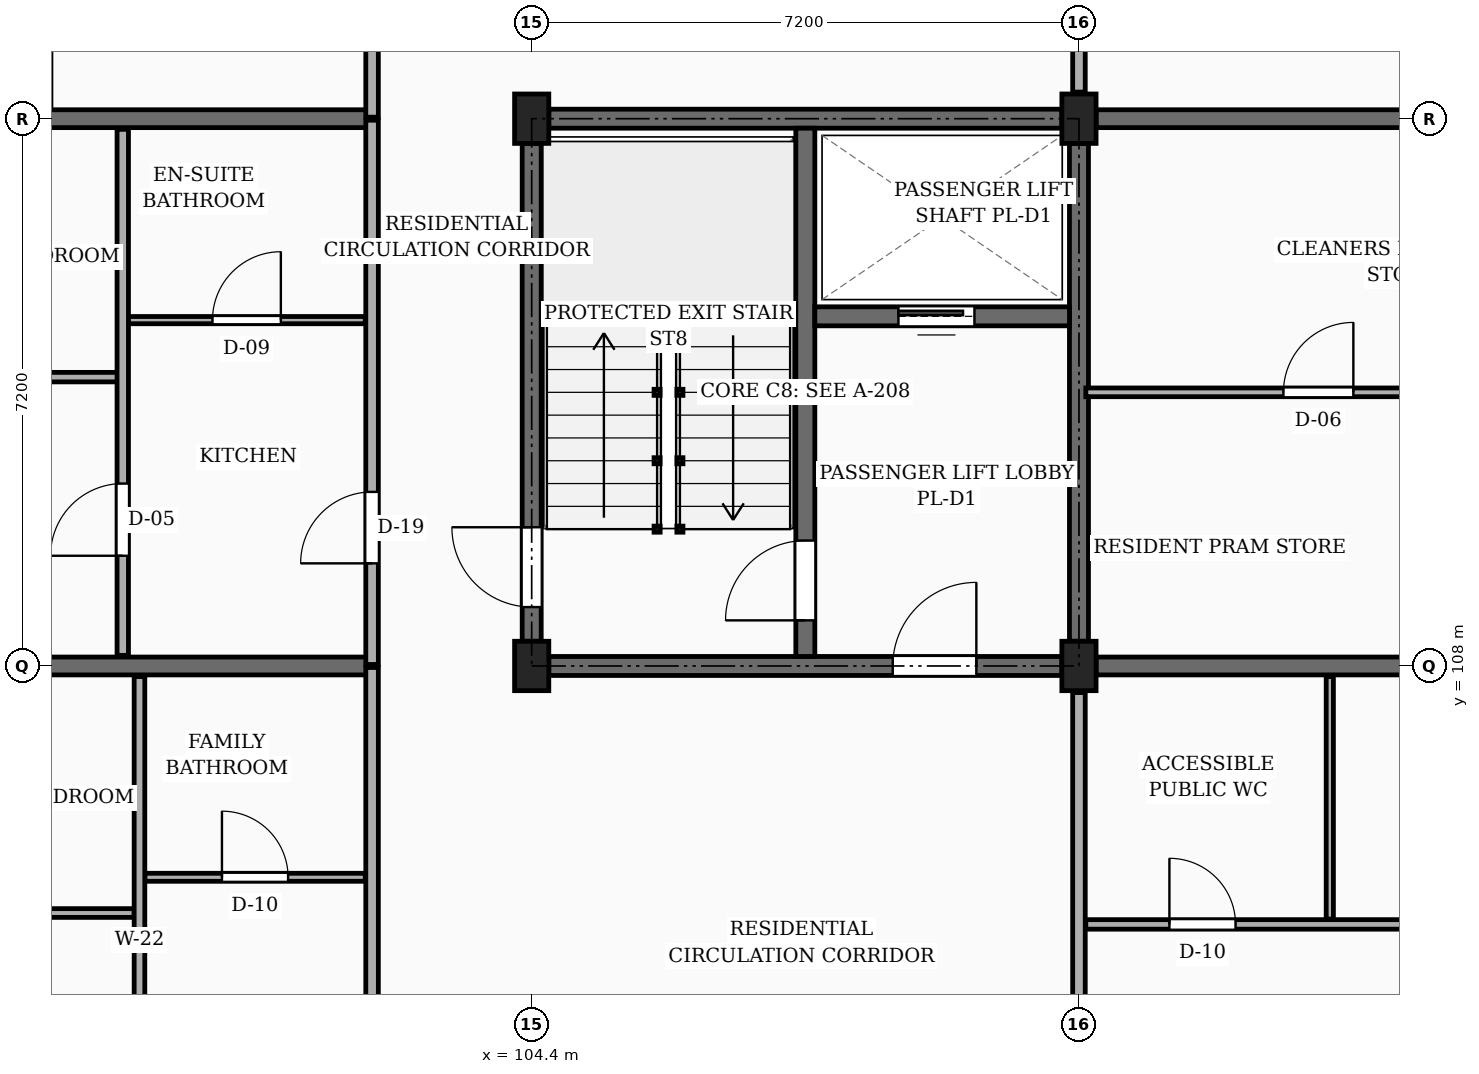
"""IFC4 building model, lengths in metres.
Left out: names, types, materials, properties, quantities, classifications, styles, units other than length and angle.
Written with IfcOpenShell. Run it as: python <this file> out.ifc"""

import sys

from ifc_helpers import new_model, si_unit, direction, frame, frame_2d, origin, origin_2d, place, context, subcontext, project, spatial, rectangle, extrude, element, fill, save


model = new_model("IFC4")
c1 = context("Model", 3, precision=1e-05, world=origin(), true_north=direction((0.0, 1.0)))
c2 = subcontext(c1, "Body", "Model", "MODEL_VIEW")
j1 = project(units=[si_unit("LENGTHUNIT", "METRE"), si_unit("PLANEANGLEUNIT", "RADIAN")], contexts=[c1])
p1 = place(None, origin())
s1 = spatial("IfcSite", under=j1, at=p1, CompositionType="ELEMENT")
p2 = place(p1, origin())
s2 = spatial("IfcBuilding", under=s1, at=p2, CompositionType="ELEMENT")
p3 = place(p2, frame((0.0, 0.0, 17.1)))
s3 = spatial("IfcBuildingStorey", under=s2, at=p3, CompositionType="ELEMENT", Elevation=17.1)
for number, where, z_axis, x_axis in (
    (1, (104.4, 108.0, 0.0), (0.0, 0.0, 1.0), (1.0, 0.0, 0.0)),
    (2, (104.4, 115.2, 0.0), (0.0, 0.0, 1.0), (1.0, 0.0, 0.0)),
    (3, (111.6, 108.0, 0.0), (0.0, 0.0, 1.0), (1.0, 0.0, 0.0)),
    (4, (111.6, 115.2, 0.0), (0.0, 0.0, 1.0), (1.0, 0.0, 0.0)),
):
    element("IfcColumn", number, at=place(p3, frame(where, z_axis=z_axis, x_axis=x_axis)), inside=s3, PredefinedType="COLUMN", context=c2, shape_type="SweptSolid", body=[
        extrude(rectangle(XDim=0.45, YDim=0.65, at=origin_2d()), origin(), (0.0, 0.0, 1.0), 3.15),
    ])
p4 = place(p3, frame((90.275, 108.0, 0.0), z_axis=(0.0, 0.0, 1.0), x_axis=(1.0, 0.0, 0.0)))
e5 = element("IfcWall", 5, at=p4, inside=s3, PredefinedType="SOLIDWALL", context=c2, shape_type="SweptSolid", body=[
    extrude(rectangle(XDim=12.025, YDim=0.235, at=frame_2d((6.013, 0.0))), origin(), (0.0, 0.0, 1.0), 2.19),
])
p5 = place(p3, frame((111.825, 108.0, 0.0), z_axis=(0.0, 0.0, 1.0), x_axis=(1.0, 0.0, 0.0)))
e6 = element("IfcWall", 6, at=p5, inside=s3, PredefinedType="SOLIDWALL", context=c2, shape_type="SweptSolid", body=[
    extrude(rectangle(XDim=6.7, YDim=0.235, at=frame_2d((3.35, 0.0))), origin(), (0.0, 0.0, 1.0), 2.19),
])
p6 = place(p5, frame((4.35, 0.0, 0.0)))
e7 = element("IfcOpeningElement", 7, at=p6, cuts=e6, PredefinedType="OPENING", context=c2, shape_type="SweptSolid", body=[
    extrude(rectangle(XDim=0.98, YDim=2.12, at=frame_2d((0.49, 1.06))), frame((0.0, 0.127, 0.0), z_axis=(0.0, -1.0, 0.0), x_axis=(1.0, 0.0, 0.0)), (0.0, 0.0, 1.0), 0.255),
])
p7 = place(p3, frame((90.275, 115.2, 0.0), z_axis=(0.0, 0.0, 1.0), x_axis=(1.0, 0.0, 0.0)))
e8 = element("IfcWall", 8, at=p7, inside=s3, PredefinedType="SOLIDWALL", context=c2, shape_type="SweptSolid", body=[
    extrude(rectangle(XDim=12.025, YDim=0.235, at=frame_2d((6.013, 0.0))), origin(), (0.0, 0.0, 1.0), 2.19),
])
p8 = place(p3, frame((111.825, 115.2, 0.0), z_axis=(0.0, 0.0, 1.0), x_axis=(1.0, 0.0, 0.0)))
e9 = element("IfcWall", 9, at=p8, inside=s3, PredefinedType="SOLIDWALL", context=c2, shape_type="SweptSolid", body=[
    extrude(rectangle(XDim=6.7, YDim=0.235, at=frame_2d((3.35, 0.0))), origin(), (0.0, 0.0, 1.0), 2.19),
])
p9 = place(p3, frame((104.4, 108.325, 0.0), z_axis=(0.0, 0.0, 1.0), x_axis=(0.0, 1.0, 0.0)))
e10 = element("IfcWall", 10, at=p9, inside=s3, PredefinedType="SHEAR", context=c2, shape_type="SweptSolid", body=[
    extrude(rectangle(XDim=6.55, YDim=0.25, at=frame_2d((3.275, 0.0))), origin(), (0.0, 0.0, 1.0), 2.89),
])
p10 = place(p9, frame((0.45, 0.0, 0.0)))
e11 = element("IfcOpeningElement", 11, at=p10, cuts=e10, PredefinedType="OPENING", context=c2, shape_type="SweptSolid", body=[
    extrude(rectangle(XDim=1.05, YDim=2.15, at=frame_2d((0.525, 1.075))), frame((0.0, 0.135, 0.0), z_axis=(0.0, -1.0, 0.0), x_axis=(1.0, 0.0, 0.0)), (0.0, 0.0, 1.0), 0.27),
])
p11 = place(p3, frame((104.625, 115.2, 0.0), z_axis=(0.0, 0.0, 1.0), x_axis=(1.0, 0.0, 0.0)))
e12 = element("IfcWall", 12, at=p11, inside=s3, PredefinedType="SHEAR", context=c2, shape_type="SweptSolid", body=[
    extrude(rectangle(XDim=6.75, YDim=0.25, at=frame_2d((3.375, 0.0))), origin(), (0.0, 0.0, 1.0), 2.89),
])
p12 = place(p3, frame((111.6, 108.325, 0.0), z_axis=(0.0, 0.0, 1.0), x_axis=(0.0, 1.0, 0.0)))
e13 = element("IfcWall", 13, at=p12, inside=s3, PredefinedType="SHEAR", context=c2, shape_type="SweptSolid", body=[
    extrude(rectangle(XDim=6.55, YDim=0.25, at=frame_2d((3.275, 0.0))), origin(), (0.0, 0.0, 1.0), 2.89),
])
p13 = place(p3, frame((104.625, 108.0, 0.0), z_axis=(0.0, 0.0, 1.0), x_axis=(1.0, 0.0, 0.0)))
e14 = element("IfcWall", 14, at=p13, inside=s3, PredefinedType="SHEAR", context=c2, shape_type="SweptSolid", body=[
    extrude(rectangle(XDim=6.75, YDim=0.25, at=frame_2d((3.375, 0.0))), origin(), (0.0, 0.0, 1.0), 2.89),
])
p14 = place(p13, frame((4.525, 0.0, 0.0)))
e15 = element("IfcOpeningElement", 15, at=p14, cuts=e14, PredefinedType="OPENING", context=c2, shape_type="SweptSolid", body=[
    extrude(rectangle(XDim=1.1, YDim=2.15, at=frame_2d((0.55, 1.075))), frame((0.0, 0.135, 0.0), z_axis=(0.0, -1.0, 0.0), x_axis=(1.0, 0.0, 0.0)), (0.0, 0.0, 1.0), 0.27),
])
p15 = place(p3, frame((108.0, 108.125, 0.0), z_axis=(0.0, 0.0, 1.0), x_axis=(0.0, 1.0, 0.0)))
e16 = element("IfcWall", 16, at=p15, inside=s3, PredefinedType="SHEAR", context=c2, shape_type="SweptSolid", body=[
    extrude(rectangle(XDim=6.95, YDim=0.25, at=frame_2d((3.475, 0.0))), origin(), (0.0, 0.0, 1.0), 2.89),
])
p16 = place(p15, frame((0.475, 0.0, 0.0)))
e17 = element("IfcOpeningElement", 17, at=p16, cuts=e16, PredefinedType="OPENING", context=c2, shape_type="SweptSolid", body=[
    extrude(rectangle(XDim=1.05, YDim=2.15, at=frame_2d((0.525, 1.075))), frame((0.0, 0.135, 0.0), z_axis=(0.0, -1.0, 0.0), x_axis=(1.0, 0.0, 0.0)), (0.0, 0.0, 1.0), 0.27),
])
p17 = place(p3, frame((108.125, 112.6, 0.0), z_axis=(0.0, 0.0, 1.0), x_axis=(1.0, 0.0, 0.0)))
e18 = element("IfcWall", 18, at=p17, inside=s3, PredefinedType="SHEAR", context=c2, shape_type="SweptSolid", body=[
    extrude(rectangle(XDim=3.35, YDim=0.25, at=frame_2d((1.675, 0.0))), origin(), (0.0, 0.0, 1.0), 2.89),
])
p18 = place(p17, frame((1.1, 0.0, 0.0)))
e19 = element("IfcOpeningElement", 19, at=p18, cuts=e18, PredefinedType="OPENING", context=c2, shape_type="SweptSolid", body=[
    extrude(rectangle(XDim=1.0, YDim=2.2, at=frame_2d((0.5, 1.1))), frame((0.0, 0.135, 0.0), z_axis=(0.0, -1.0, 0.0), x_axis=(1.0, 0.0, 0.0)), (0.0, 0.0, 1.0), 0.27),
])
p19 = place(p3, frame((102.3, 100.82, 0.0), z_axis=(0.0, 0.0, 1.0), x_axis=(0.0, 1.0, 0.0)))
e20 = element("IfcWall", 20, at=p19, inside=s3, PredefinedType="PARTITIONING", context=c2, shape_type="SweptSolid", body=[
    extrude(rectangle(XDim=7.16, YDim=0.165, at=frame_2d((3.58, 0.0))), origin(), (0.0, 0.0, 1.0), 2.325),
])
p20 = place(p19, frame((1.33, 0.0, 0.0)))
e21 = element("IfcOpeningElement", 21, at=p20, cuts=e20, PredefinedType="OPENING", context=c2, shape_type="SweptSolid", body=[
    extrude(rectangle(XDim=1.0, YDim=2.15, at=frame_2d((0.5, 1.075))), frame((0.0, 0.093, 0.0), z_axis=(0.0, -1.0, 0.0), x_axis=(1.0, 0.0, 0.0)), (0.0, 0.0, 1.0), 0.185),
])
p21 = place(p3, frame((102.3, 108.02, 0.0), z_axis=(0.0, 0.0, 1.0), x_axis=(0.0, 1.0, 0.0)))
e22 = element("IfcWall", 22, at=p21, inside=s3, PredefinedType="PARTITIONING", context=c2, shape_type="SweptSolid", body=[
    extrude(rectangle(XDim=7.16, YDim=0.165, at=frame_2d((3.58, 0.0))), origin(), (0.0, 0.0, 1.0), 2.325),
])
p22 = place(p21, frame((1.33, 0.0, 0.0)))
e23 = element("IfcOpeningElement", 23, at=p22, cuts=e22, PredefinedType="OPENING", context=c2, shape_type="SweptSolid", body=[
    extrude(rectangle(XDim=0.94, YDim=2.12, at=frame_2d((0.47, 1.06))), frame((0.0, 0.093, 0.0), z_axis=(0.0, -1.0, 0.0), x_axis=(1.0, 0.0, 0.0)), (0.0, 0.0, 1.0), 0.185),
])
p23 = place(p3, frame((102.3, 115.22, 0.0), z_axis=(0.0, 0.0, 1.0), x_axis=(0.0, 1.0, 0.0)))
e24 = element("IfcWall", 24, at=p23, inside=s3, PredefinedType="PARTITIONING", context=c2, shape_type="SweptSolid", body=[
    extrude(rectangle(XDim=7.16, YDim=0.165, at=frame_2d((3.58, 0.0))), origin(), (0.0, 0.0, 1.0), 2.325),
])
p24 = place(p23, frame((4.78, 0.0, 0.0)))
e25 = element("IfcOpeningElement", 25, at=p24, cuts=e24, PredefinedType="OPENING", context=c2, shape_type="SweptSolid", body=[
    extrude(rectangle(XDim=1.14, YDim=2.18, at=frame_2d((0.57, 1.09))), frame((0.0, 0.093, 0.0), z_axis=(0.0, -1.0, 0.0), x_axis=(1.0, 0.0, 0.0)), (0.0, 0.0, 1.0), 0.185),
])
p25 = place(p3, frame((111.6, 101.15, 0.0), z_axis=(0.0, 0.0, 1.0), x_axis=(0.0, 1.0, 0.0)))
e26 = element("IfcWall", 26, at=p25, inside=s3, PredefinedType="PARTITIONING", context=c2, shape_type="SweptSolid", body=[
    extrude(rectangle(XDim=6.5, YDim=0.165, at=frame_2d((3.25, 0.0))), origin(), (0.0, 0.0, 1.0), 2.325),
])
p26 = place(p25, frame((1.1, 0.0, 0.0)))
e27 = element("IfcOpeningElement", 27, at=p26, cuts=e26, PredefinedType="OPENING", context=c2, shape_type="SweptSolid", body=[
    extrude(rectangle(XDim=1.0, YDim=2.15, at=frame_2d((0.5, 1.075))), frame((0.0, 0.093, 0.0), z_axis=(0.0, -1.0, 0.0), x_axis=(1.0, 0.0, 0.0)), (0.0, 0.0, 1.0), 0.185),
])
p27 = place(p3, frame((111.6, 115.55, 0.0), z_axis=(0.0, 0.0, 1.0), x_axis=(0.0, 1.0, 0.0)))
e28 = element("IfcWall", 28, at=p27, inside=s3, PredefinedType="PARTITIONING", context=c2, shape_type="SweptSolid", body=[
    extrude(rectangle(XDim=6.5, YDim=0.165, at=frame_2d((3.25, 0.0))), origin(), (0.0, 0.0, 1.0), 2.325),
])
p28 = place(p27, frame((1.1, 0.0, 0.0)))
e29 = element("IfcOpeningElement", 29, at=p28, cuts=e28, PredefinedType="OPENING", context=c2, shape_type="SweptSolid", body=[
    extrude(rectangle(XDim=0.94, YDim=2.12, at=frame_2d((0.47, 1.06))), frame((0.0, 0.093, 0.0), z_axis=(0.0, -1.0, 0.0), x_axis=(1.0, 0.0, 0.0)), (0.0, 0.0, 1.0), 0.185),
])
p29 = place(p3, frame((90.175, 104.75, 0.0), z_axis=(0.0, 0.0, 1.0), x_axis=(1.0, 0.0, 0.0)))
e30 = element("IfcWall", 30, at=p29, inside=s3, PredefinedType="PARTITIONING", context=c2, shape_type="SweptSolid", body=[
    extrude(rectangle(XDim=8.995, YDim=0.115, at=frame_2d((4.498, 0.0))), origin(), (0.0, 0.0, 1.0), 2.325),
])
p30 = place(p29, frame((4.058, 0.0, 0.0)))
e31 = element("IfcOpeningElement", 31, at=p30, cuts=e30, PredefinedType="OPENING", context=c2, shape_type="SweptSolid", body=[
    extrude(rectangle(XDim=0.88, YDim=2.08, at=frame_2d((0.44, 1.04))), frame((0.0, 0.067, 0.0), z_axis=(0.0, -1.0, 0.0), x_axis=(1.0, 0.0, 0.0)), (0.0, 0.0, 1.0), 0.135),
])
p31 = place(p3, frame((99.31, 105.22, 0.0), z_axis=(0.0, 0.0, 1.0), x_axis=(1.0, 0.0, 0.0)))
e32 = element("IfcWall", 32, at=p31, inside=s3, PredefinedType="PARTITIONING", context=c2, shape_type="SweptSolid", body=[
    extrude(rectangle(XDim=2.9, YDim=0.105, at=frame_2d((1.45, 0.0))), origin(), (0.0, 0.0, 1.0), 2.325),
])
p32 = place(p31, frame((1.015, 0.0, 0.0)))
e33 = element("IfcOpeningElement", 33, at=p32, cuts=e32, PredefinedType="OPENING", context=c2, shape_type="SweptSolid", body=[
    extrude(rectangle(XDim=0.87, YDim=2.05, at=frame_2d((0.435, 1.025))), frame((0.0, 0.062, 0.0), z_axis=(0.0, -1.0, 0.0), x_axis=(1.0, 0.0, 0.0)), (0.0, 0.0, 1.0), 0.125),
])
p33 = place(p3, frame((99.24, 100.94, 0.0), z_axis=(0.0, 0.0, 1.0), x_axis=(0.0, 1.0, 0.0)))
e34 = element("IfcWall", 34, at=p33, inside=s3, PredefinedType="PARTITIONING", context=c2, shape_type="SweptSolid", body=[
    extrude(rectangle(XDim=6.92, YDim=0.14, at=frame_2d((3.46, 0.0))), origin(), (0.0, 0.0, 1.0), 2.325),
])
p34 = place(p33, frame((1.31, 0.0, 0.0)))
e35 = element("IfcOpeningElement", 35, at=p34, cuts=e34, PredefinedType="OPENING", context=c2, shape_type="SweptSolid", body=[
    extrude(rectangle(XDim=0.92, YDim=2.1, at=frame_2d((0.46, 1.05))), frame((0.0, 0.08, 0.0), z_axis=(0.0, -1.0, 0.0), x_axis=(1.0, 0.0, 0.0)), (0.0, 0.0, 1.0), 0.16),
])
p35 = place(p3, frame((111.69, 104.6, 0.0), z_axis=(0.0, 0.0, 1.0), x_axis=(1.0, 0.0, 0.0)))
e36 = element("IfcWall", 36, at=p35, inside=s3, PredefinedType="PARTITIONING", context=c2, shape_type="SweptSolid", body=[
    extrude(rectangle(XDim=6.935, YDim=0.125, at=frame_2d((3.468, 0.0))), origin(), (0.0, 0.0, 1.0), 2.325),
])
p36 = place(p35, frame((1.1, 0.0, 0.0)))
e37 = element("IfcOpeningElement", 37, at=p36, cuts=e36, PredefinedType="OPENING", context=c2, shape_type="SweptSolid", body=[
    extrude(rectangle(XDim=0.87, YDim=2.05, at=frame_2d((0.435, 1.025))), frame((0.0, 0.073, 0.0), z_axis=(0.0, -1.0, 0.0), x_axis=(1.0, 0.0, 0.0)), (0.0, 0.0, 1.0), 0.145),
])
p37 = place(p35, frame((4.5, 0.0, 0.0)))
e38 = element("IfcOpeningElement", 38, at=p37, cuts=e36, PredefinedType="OPENING", context=c2, shape_type="SweptSolid", body=[
    extrude(rectangle(XDim=0.92, YDim=2.1, at=frame_2d((0.46, 1.05))), frame((0.0, 0.073, 0.0), z_axis=(0.0, -1.0, 0.0), x_axis=(1.0, 0.0, 0.0)), (0.0, 0.0, 1.0), 0.145),
])
p38 = place(p3, frame((114.9, 104.67, 0.0), z_axis=(0.0, 0.0, 1.0), x_axis=(0.0, 1.0, 0.0)))
e39 = element("IfcWall", 39, at=p38, inside=s3, PredefinedType="PARTITIONING", context=c2, shape_type="SweptSolid", body=[
    extrude(rectangle(XDim=3.19, YDim=0.095, at=frame_2d((1.595, 0.0))), origin(), (0.0, 0.0, 1.0), 2.325),
])
p39 = place(p3, frame((90.175, 111.8, 0.0), z_axis=(0.0, 0.0, 1.0), x_axis=(1.0, 0.0, 0.0)))
e40 = element("IfcWall", 40, at=p39, inside=s3, PredefinedType="PARTITIONING", context=c2, shape_type="SweptSolid", body=[
    extrude(rectangle(XDim=8.775, YDim=0.125, at=frame_2d((4.387, 0.0))), origin(), (0.0, 0.0, 1.0), 2.325),
])
p40 = place(p39, frame((3.938, 0.0, 0.0)))
e41 = element("IfcOpeningElement", 41, at=p40, cuts=e40, PredefinedType="OPENING", context=c2, shape_type="SweptSolid", body=[
    extrude(rectangle(XDim=0.9, YDim=2.1, at=frame_2d((0.45, 1.05))), frame((0.0, 0.073, 0.0), z_axis=(0.0, -1.0, 0.0), x_axis=(1.0, 0.0, 0.0)), (0.0, 0.0, 1.0), 0.145),
])
p41 = place(p3, frame((99.09, 112.55, 0.0), z_axis=(0.0, 0.0, 1.0), x_axis=(1.0, 0.0, 0.0)))
e42 = element("IfcWall", 42, at=p41, inside=s3, PredefinedType="PARTITIONING", context=c2, shape_type="SweptSolid", body=[
    extrude(rectangle(XDim=3.12, YDim=0.095, at=frame_2d((1.56, 0.0))), origin(), (0.0, 0.0, 1.0), 2.325),
])
p42 = place(p41, frame((1.11, 0.0, 0.0)))
e43 = element("IfcOpeningElement", 43, at=p42, cuts=e42, PredefinedType="OPENING", context=c2, shape_type="SweptSolid", body=[
    extrude(rectangle(XDim=0.9, YDim=2.05, at=frame_2d((0.45, 1.025))), frame((0.0, 0.058, 0.0), z_axis=(0.0, -1.0, 0.0), x_axis=(1.0, 0.0, 0.0)), (0.0, 0.0, 1.0), 0.115),
])
p43 = place(p3, frame((99.02, 108.14, 0.0), z_axis=(0.0, 0.0, 1.0), x_axis=(0.0, 1.0, 0.0)))
e44 = element("IfcWall", 44, at=p43, inside=s3, PredefinedType="PARTITIONING", context=c2, shape_type="SweptSolid", body=[
    extrude(rectangle(XDim=6.92, YDim=0.15, at=frame_2d((3.46, 0.0))), origin(), (0.0, 0.0, 1.0), 2.325),
])
p44 = place(p43, frame((1.31, 0.0, 0.0)))
e45 = element("IfcOpeningElement", 45, at=p44, cuts=e44, PredefinedType="OPENING", context=c2, shape_type="SweptSolid", body=[
    extrude(rectangle(XDim=0.95, YDim=2.1, at=frame_2d((0.475, 1.05))), frame((0.0, 0.085, 0.0), z_axis=(0.0, -1.0, 0.0), x_axis=(1.0, 0.0, 0.0)), (0.0, 0.0, 1.0), 0.17),
])
p45 = place(p3, frame((111.69, 111.6, 0.0), z_axis=(0.0, 0.0, 1.0), x_axis=(1.0, 0.0, 0.0)))
e46 = element("IfcWall", 46, at=p45, inside=s3, PredefinedType="PARTITIONING", context=c2, shape_type="SweptSolid", body=[
    extrude(rectangle(XDim=6.935, YDim=0.115, at=frame_2d((3.468, 0.0))), origin(), (0.0, 0.0, 1.0), 2.325),
])
p46 = place(p45, frame((2.6, 0.0, 0.0)))
e47 = element("IfcOpeningElement", 47, at=p46, cuts=e46, PredefinedType="OPENING", context=c2, shape_type="SweptSolid", body=[
    extrude(rectangle(XDim=0.92, YDim=2.1, at=frame_2d((0.46, 1.05))), frame((0.0, 0.067, 0.0), z_axis=(0.0, -1.0, 0.0), x_axis=(1.0, 0.0, 0.0)), (0.0, 0.0, 1.0), 0.135),
])
p47 = place(p10, origin())
e48 = element("IfcDoor", 48, at=p47, inside=s3, OperationType="SINGLE_SWING_RIGHT", PredefinedType="DOOR", context=c2, shape_type="SweptSolid", body=[
    extrude(rectangle(XDim=1.05, YDim=2.15, at=frame_2d((0.525, 1.075))), frame((0.0, 0.025, 0.0), z_axis=(0.0, -1.0, 0.0), x_axis=(1.0, 0.0, 0.0)), (0.0, 0.0, 1.0), 0.05),
])
fill(e11, e48)
p48 = place(p14, frame((1.1, 0.0, 0.0), z_axis=(0.0, 0.0, 1.0), x_axis=(-1.0, 0.0, 0.0)))
e49 = element("IfcDoor", 49, at=p48, inside=s3, OperationType="SINGLE_SWING_RIGHT", PredefinedType="DOOR", context=c2, shape_type="SweptSolid", body=[
    extrude(rectangle(XDim=1.1, YDim=2.15, at=frame_2d((0.55, 1.075))), frame((0.0, 0.025, 0.0), z_axis=(0.0, -1.0, 0.0), x_axis=(1.0, 0.0, 0.0)), (0.0, 0.0, 1.0), 0.05),
])
fill(e15, e49)
p49 = place(p16, origin())
e50 = element("IfcDoor", 50, at=p49, inside=s3, OperationType="SINGLE_SWING_LEFT", PredefinedType="DOOR", context=c2, shape_type="SweptSolid", body=[
    extrude(rectangle(XDim=1.05, YDim=2.15, at=frame_2d((0.525, 1.075))), frame((0.0, 0.025, 0.0), z_axis=(0.0, -1.0, 0.0), x_axis=(1.0, 0.0, 0.0)), (0.0, 0.0, 1.0), 0.05),
])
fill(e17, e50)
p50 = place(p18, origin())
e51 = element("IfcDoor", 51, at=p50, inside=s3, OperationType="SLIDING_TO_LEFT", PredefinedType="DOOR", context=c2, shape_type="SweptSolid", body=[
    extrude(rectangle(XDim=1.0, YDim=2.2, at=frame_2d((0.5, 1.1))), frame((0.0, 0.025, 0.0), z_axis=(0.0, -1.0, 0.0), x_axis=(1.0, 0.0, 0.0)), (0.0, 0.0, 1.0), 0.05),
])
fill(e19, e51)
p51 = place(p22, origin())
e52 = element("IfcDoor", 52, at=p51, inside=s3, OperationType="SINGLE_SWING_LEFT", PredefinedType="DOOR", context=c2, shape_type="SweptSolid", body=[
    extrude(rectangle(XDim=0.94, YDim=2.12, at=frame_2d((0.47, 1.06))), frame((0.0, 0.025, 0.0), z_axis=(0.0, -1.0, 0.0), x_axis=(1.0, 0.0, 0.0)), (0.0, 0.0, 1.0), 0.05),
])
fill(e23, e52)
p52 = place(p32, origin())
e53 = element("IfcDoor", 53, at=p52, inside=s3, OperationType="SINGLE_SWING_LEFT", PredefinedType="DOOR", context=c2, shape_type="SweptSolid", body=[
    extrude(rectangle(XDim=0.87, YDim=2.05, at=frame_2d((0.435, 1.025))), frame((0.0, 0.025, 0.0), z_axis=(0.0, -1.0, 0.0), x_axis=(1.0, 0.0, 0.0)), (0.0, 0.0, 1.0), 0.05),
])
fill(e33, e53)
p53 = place(p36, origin())
e54 = element("IfcDoor", 54, at=p53, inside=s3, OperationType="SINGLE_SWING_LEFT", PredefinedType="DOOR", context=c2, shape_type="SweptSolid", body=[
    extrude(rectangle(XDim=0.87, YDim=2.05, at=frame_2d((0.435, 1.025))), frame((0.0, 0.025, 0.0), z_axis=(0.0, -1.0, 0.0), x_axis=(1.0, 0.0, 0.0)), (0.0, 0.0, 1.0), 0.05),
])
fill(e37, e54)
p54 = place(p42, origin())
e55 = element("IfcDoor", 55, at=p54, inside=s3, OperationType="SINGLE_SWING_RIGHT", PredefinedType="DOOR", context=c2, shape_type="SweptSolid", body=[
    extrude(rectangle(XDim=0.9, YDim=2.05, at=frame_2d((0.45, 1.025))), frame((0.0, 0.025, 0.0), z_axis=(0.0, -1.0, 0.0), x_axis=(1.0, 0.0, 0.0)), (0.0, 0.0, 1.0), 0.05),
])
fill(e43, e55)
p55 = place(p44, origin())
e56 = element("IfcDoor", 56, at=p55, inside=s3, OperationType="SINGLE_SWING_LEFT", PredefinedType="DOOR", context=c2, shape_type="SweptSolid", body=[
    extrude(rectangle(XDim=0.95, YDim=2.1, at=frame_2d((0.475, 1.05))), frame((0.0, 0.025, 0.0), z_axis=(0.0, -1.0, 0.0), x_axis=(1.0, 0.0, 0.0)), (0.0, 0.0, 1.0), 0.05),
])
fill(e45, e56)
p56 = place(p46, origin())
e57 = element("IfcDoor", 57, at=p56, inside=s3, OperationType="SINGLE_SWING_RIGHT", PredefinedType="DOOR", context=c2, shape_type="SweptSolid", body=[
    extrude(rectangle(XDim=0.92, YDim=2.1, at=frame_2d((0.46, 1.05))), frame((0.0, 0.025, 0.0), z_axis=(0.0, -1.0, 0.0), x_axis=(1.0, 0.0, 0.0)), (0.0, 0.0, 1.0), 0.05),
])
fill(e47, e57)
save(model, sys.argv[1])
